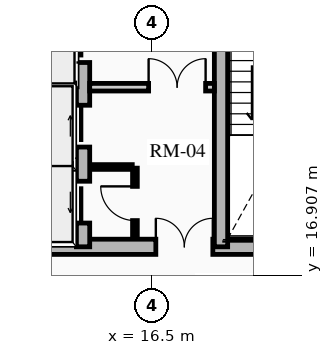
"""IFC4 building model, lengths in metres.
Left out: names, types, materials, properties, quantities, classifications, styles, units other than length and angle.
Written with IfcOpenShell. Run it as: python <this file> out.ifc"""

import sys

from ifc_helpers import new_model, si_unit, direction, frame, frame_2d, origin, place, context, subcontext, project, spatial, rectangle, extrude, source, transform, mapped, element, fill, save


model = new_model("IFC4")
c1 = context("Model", 3, precision=1e-05, world=origin(), true_north=direction((0.0, 1.0)))
c2 = subcontext(c1, "Body", "Model", "MODEL_VIEW")
j1 = project(units=[si_unit("LENGTHUNIT", "METRE"), si_unit("PLANEANGLEUNIT", "RADIAN")], contexts=[c1])
p1 = place(None, origin())
s1 = spatial("IfcSite", under=j1, at=p1, CompositionType="ELEMENT")
p2 = place(p1, origin())
s2 = spatial("IfcBuilding", under=s1, at=p2, CompositionType="ELEMENT")
p3 = place(p2, frame((0.0, 0.0, 174.88)))
s3 = spatial("IfcBuildingStorey", under=s2, at=p3, CompositionType="ELEMENT", Elevation=174.88)
p4 = place(p3, frame((11.15, 17.65, 0.0), z_axis=(0.0, 0.0, 1.0), x_axis=(1.0, 0.0, 0.0)))
e1 = element("IfcWall", 1, at=p4, inside=s3, PredefinedType="SHEAR", context=c2, shape_type="SweptSolid", body=[
    extrude(rectangle(XDim=10.7, YDim=0.4, at=frame_2d((5.35, 0.0))), origin(), (0.0, 0.0, 1.0), 2.91),
])
m1 = source(origin(), c2, "Body", "SweptSolid", [
    extrude(rectangle(XDim=1.5, YDim=2.02, at=frame_2d((0.75, 1.01))), frame((0.0, 0.21, 0.0), z_axis=(0.0, -1.0, 0.0), x_axis=(1.0, 0.0, 0.0)), (0.0, 0.0, 1.0), 0.42),
])
p5 = place(p4, frame((5.45, 0.0, 0.0)))
e2 = element("IfcOpeningElement", 2, at=p5, cuts=e1, PredefinedType="OPENING", context=c2, shape_type="MappedRepresentation", body=[
    mapped(m1, transform((0.0, 0.0, 0.0), x_axis=(1.0, 0.0, 0.0), y_axis=(0.0, 1.0, 0.0), z_axis=(0.0, 0.0, 1.0), scale=1.0)),
])
p6 = place(p3, frame((14.685, 17.65, 0.0), z_axis=(0.0, 0.0, 1.0), x_axis=(0.0, 1.0, 0.0)))
e3 = element("IfcWall", 3, at=p6, inside=s3, PredefinedType="SHEAR", context=c2, shape_type="SweptSolid", body=[
    extrude(rectangle(XDim=13.7, YDim=0.35, at=frame_2d((6.85, 0.0))), origin(), (0.0, 0.0, 1.0), 2.91),
])
m2 = source(origin(), c2, "Body", "SweptSolid", [
    extrude(rectangle(XDim=1.1, YDim=2.015, at=frame_2d((0.55, 1.007))), frame((0.0, 0.185, 0.0), z_axis=(0.0, -1.0, 0.0), x_axis=(1.0, 0.0, 0.0)), (0.0, 0.0, 1.0), 0.37),
])
p7 = place(p6, frame((4.85, 0.0, 0.0)))
e4 = element("IfcOpeningElement", 4, at=p7, cuts=e3, PredefinedType="OPENING", context=c2, shape_type="MappedRepresentation", body=[
    mapped(m2, transform((0.0, 0.0, 0.0), x_axis=(1.0, 0.0, 0.0), y_axis=(0.0, 1.0, 0.0), z_axis=(0.0, 0.0, 1.0), scale=1.0)),
])
p8 = place(p6, frame((0.625, 0.0, 0.0)))
e5 = element("IfcOpeningElement", 5, at=p8, cuts=e3, PredefinedType="OPENING", context=c2, shape_type="MappedRepresentation", body=[
    mapped(m2, transform((0.0, 0.0, 0.0), x_axis=(1.0, 0.0, 0.0), y_axis=(0.0, 1.0, 0.0), z_axis=(0.0, 0.0, 1.0), scale=1.0)),
])
p9 = place(p6, frame((2.625, 0.0, 0.0)))
e6 = element("IfcOpeningElement", 6, at=p9, cuts=e3, PredefinedType="OPENING", context=c2, shape_type="MappedRepresentation", body=[
    mapped(m2, transform((0.0, 0.0, 0.0), x_axis=(1.0, 0.0, 0.0), y_axis=(0.0, 1.0, 0.0), z_axis=(0.0, 0.0, 1.0), scale=1.0)),
])
m3 = source(origin(), c2, "Body", "SweptSolid", [
    extrude(rectangle(XDim=1.15, YDim=2.02, at=frame_2d((0.575, 1.01))), frame((0.0, 0.185, 0.0), z_axis=(0.0, -1.0, 0.0), x_axis=(1.0, 0.0, 0.0)), (0.0, 0.0, 1.0), 0.37),
])
p10 = place(p6, frame((7.27, 0.0, 0.0)))
e7 = element("IfcOpeningElement", 7, at=p10, cuts=e3, PredefinedType="OPENING", context=c2, shape_type="MappedRepresentation", body=[
    mapped(m3, transform((0.0, 0.0, 0.0), x_axis=(1.0, 0.0, 0.0), y_axis=(0.0, 1.0, 0.0), z_axis=(0.0, 0.0, 1.0), scale=1.0)),
])
p11 = place(p3, frame((18.315, 17.65, 0.0), z_axis=(0.0, 0.0, 1.0), x_axis=(0.0, 1.0, 0.0)))
e8 = element("IfcWall", 8, at=p11, inside=s3, PredefinedType="SHEAR", context=c2, shape_type="SweptSolid", body=[
    extrude(rectangle(XDim=9.6, YDim=0.35, at=frame_2d((4.8, 0.0))), origin(), (0.0, 0.0, 1.0), 2.91),
])
p12 = place(p11, frame((5.28, 0.0, 0.0)))
e9 = element("IfcOpeningElement", 9, at=p12, cuts=e8, PredefinedType="OPENING", context=c2, shape_type="MappedRepresentation", body=[
    mapped(m3, transform((0.0, 0.0, 0.0), x_axis=(1.0, 0.0, 0.0), y_axis=(0.0, 1.0, 0.0), z_axis=(0.0, 0.0, 1.0), scale=1.0)),
])
for number, where, z_axis, x_axis in (
    (10, (11.52, 21.8, 0.0), (0.0, 0.0, 1.0), (1.0, 0.0, 0.0)),
    (11, (11.52, 19.825, 0.0), (0.0, 0.0, 1.0), (1.0, 0.0, 0.0)),
):
    element("IfcWall", number, at=place(p3, frame(where, z_axis=z_axis, x_axis=x_axis)), inside=s3, PredefinedType="SHEAR", context=c2, shape_type="SweptSolid", body=[
        extrude(rectangle(XDim=2.97, YDim=0.2, at=frame_2d((1.485, 0.0))), origin(), (0.0, 0.0, 1.0), 2.91),
    ])
p13 = place(p3, frame((14.86, 21.85, 0.0), z_axis=(0.0, 0.0, 1.0), x_axis=(1.0, 0.0, 0.0)))
e12 = element("IfcWall", 12, at=p13, inside=s3, PredefinedType="PARTITIONING", context=c2, shape_type="SweptSolid", body=[
    extrude(rectangle(XDim=3.28, YDim=0.2, at=frame_2d((1.64, 0.0))), origin(), (0.0, 0.0, 1.0), 2.675),
])
m4 = source(origin(), c2, "Body", "SweptSolid", [
    extrude(rectangle(XDim=1.5, YDim=2.02, at=frame_2d((0.75, 1.01))), frame((0.0, 0.11, 0.0), z_axis=(0.0, -1.0, 0.0), x_axis=(1.0, 0.0, 0.0)), (0.0, 0.0, 1.0), 0.22),
])
p14 = place(p13, frame((1.55, 0.0, 0.0)))
e13 = element("IfcOpeningElement", 13, at=p14, cuts=e12, PredefinedType="OPENING", context=c2, shape_type="MappedRepresentation", body=[
    mapped(m4, transform((0.0, 0.0, 0.0), x_axis=(1.0, 0.0, 0.0), y_axis=(0.0, 1.0, 0.0), z_axis=(0.0, 0.0, 1.0), scale=1.0)),
])
p15 = place(p3, frame((16.05, 17.92, 0.0), z_axis=(0.0, 0.0, 1.0), x_axis=(0.0, 1.0, 0.0)))
e14 = element("IfcWall", 14, at=p15, inside=s3, PredefinedType="PARTITIONING", context=c2, shape_type="SweptSolid", body=[
    extrude(rectangle(XDim=1.8, YDim=0.125, at=frame_2d((0.9, 0.0))), origin(), (0.0, 0.0, 1.0), 2.675),
])
m5 = source(origin(), c2, "Body", "SweptSolid", [
    extrude(rectangle(XDim=0.9, YDim=2.005, at=frame_2d((0.45, 1.002))), frame((0.0, 0.073, 0.0), z_axis=(0.0, -1.0, 0.0), x_axis=(1.0, 0.0, 0.0)), (0.0, 0.0, 1.0), 0.145),
])
p16 = place(p15, frame((0.42, 0.0, 0.0)))
e15 = element("IfcOpeningElement", 15, at=p16, cuts=e14, PredefinedType="OPENING", context=c2, shape_type="MappedRepresentation", body=[
    mapped(m5, transform((0.0, 0.0, 0.0), x_axis=(1.0, 0.0, 0.0), y_axis=(0.0, 1.0, 0.0), z_axis=(0.0, 0.0, 1.0), scale=1.0)),
])
p17 = place(p3, frame((14.88, 19.75, 0.0), z_axis=(0.0, 0.0, 1.0), x_axis=(1.0, 0.0, 0.0)))
e16 = element("IfcWall", 16, at=p17, inside=s3, PredefinedType="PARTITIONING", context=c2, shape_type="SweptSolid", body=[
    extrude(rectangle(XDim=1.1, YDim=0.125, at=frame_2d((0.55, 0.0))), origin(), (0.0, 0.0, 1.0), 2.675),
])
m6 = source(origin(), c2, "Body", "SweptSolid", [
    extrude(rectangle(XDim=1.1, YDim=2.015, at=frame_2d((0.55, 1.007))), frame((0.0, 0.025, 0.0), z_axis=(0.0, -1.0, 0.0), x_axis=(1.0, 0.0, 0.0)), (0.0, 0.0, 1.0), 0.05),
])
p18 = place(p7, origin())
e17 = element("IfcDoor", 17, at=p18, inside=s3, OperationType="SLIDING_TO_RIGHT", PredefinedType="DOOR", context=c2, shape_type="MappedRepresentation", body=[
    mapped(m6, transform((0.0, 0.0, 0.0), x_axis=(1.0, 0.0, 0.0), y_axis=(0.0, 1.0, 0.0), z_axis=(0.0, 0.0, 1.0), scale=1.0)),
])
fill(e4, e17)
p19 = place(p8, origin())
e18 = element("IfcDoor", 18, at=p19, inside=s3, OperationType="SLIDING_TO_LEFT", PredefinedType="DOOR", context=c2, shape_type="MappedRepresentation", body=[
    mapped(m6, transform((0.0, 0.0, 0.0), x_axis=(1.0, 0.0, 0.0), y_axis=(0.0, 1.0, 0.0), z_axis=(0.0, 0.0, 1.0), scale=1.0)),
])
fill(e5, e18)
p20 = place(p9, origin())
e19 = element("IfcDoor", 19, at=p20, inside=s3, OperationType="SLIDING_TO_RIGHT", PredefinedType="DOOR", context=c2, shape_type="MappedRepresentation", body=[
    mapped(m6, transform((0.0, 0.0, 0.0), x_axis=(1.0, 0.0, 0.0), y_axis=(0.0, 1.0, 0.0), z_axis=(0.0, 0.0, 1.0), scale=1.0)),
])
fill(e6, e19)
m7 = source(origin(), c2, "Body", "SweptSolid", [
    extrude(rectangle(XDim=1.5, YDim=2.02, at=frame_2d((0.75, 1.01))), frame((0.0, 0.025, 0.0), z_axis=(0.0, -1.0, 0.0), x_axis=(1.0, 0.0, 0.0)), (0.0, 0.0, 1.0), 0.05),
])
p21 = place(p5, origin())
e20 = element("IfcDoor", 20, at=p21, inside=s3, OperationType="DOUBLE_DOOR_SINGLE_SWING", PredefinedType="DOOR", context=c2, shape_type="MappedRepresentation", body=[
    mapped(m7, transform((0.0, 0.0, 0.0), x_axis=(1.0, 0.0, 0.0), y_axis=(0.0, 1.0, 0.0), z_axis=(0.0, 0.0, 1.0), scale=1.0)),
])
fill(e2, e20)
p22 = place(p14, origin())
e21 = element("IfcDoor", 21, at=p22, inside=s3, OperationType="DOUBLE_DOOR_SINGLE_SWING", PredefinedType="DOOR", context=c2, shape_type="MappedRepresentation", body=[
    mapped(m7, transform((0.0, 0.0, 0.0), x_axis=(1.0, 0.0, 0.0), y_axis=(0.0, 1.0, 0.0), z_axis=(0.0, 0.0, 1.0), scale=1.0)),
])
fill(e13, e21)
m8 = source(origin(), c2, "Body", "SweptSolid", [
    extrude(rectangle(XDim=0.9, YDim=2.005, at=frame_2d((0.45, 1.002))), frame((0.0, 0.025, 0.0), z_axis=(0.0, -1.0, 0.0), x_axis=(1.0, 0.0, 0.0)), (0.0, 0.0, 1.0), 0.05),
])
p23 = place(p16, origin())
e22 = element("IfcDoor", 22, at=p23, inside=s3, OperationType="SINGLE_SWING_RIGHT", PredefinedType="DOOR", context=c2, shape_type="MappedRepresentation", body=[
    mapped(m8, transform((0.0, 0.0, 0.0), x_axis=(1.0, 0.0, 0.0), y_axis=(0.0, 1.0, 0.0), z_axis=(0.0, 0.0, 1.0), scale=1.0)),
])
fill(e15, e22)
save(model, sys.argv[1])
